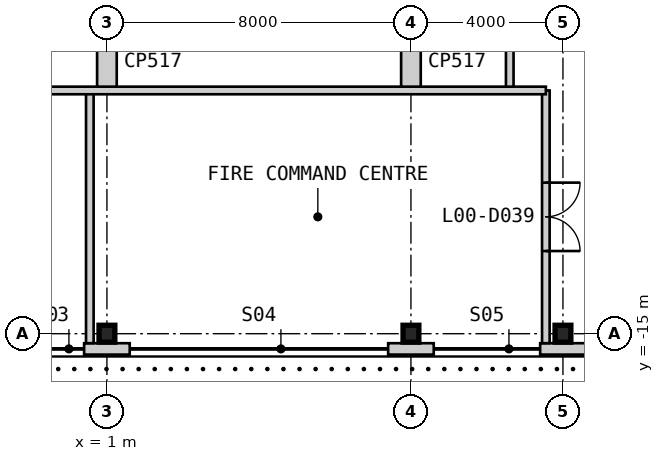
"""IFC4 building model, lengths in metres.
Left out: names, types, materials, properties, quantities, classifications, styles, units other than length and angle.
Written with IfcOpenShell. Run it as: python <this file> out.ifc"""

import sys

from ifc_helpers import new_model, si_unit, direction, frame, frame_2d, origin, origin_2d, place, context, subcontext, project, spatial, rectangle, i_section, extrude, element, fill, save


model = new_model("IFC4")
c1 = context("Model", 3, precision=1e-05, world=origin(), true_north=direction((0.0, 1.0)))
c2 = subcontext(c1, "Body", "Model", "MODEL_VIEW")
j1 = project(units=[si_unit("LENGTHUNIT", "METRE"), si_unit("PLANEANGLEUNIT", "RADIAN")], contexts=[c1])
p1 = place(None, origin())
s1 = spatial("IfcSite", under=j1, at=p1, CompositionType="ELEMENT")
p2 = place(p1, origin())
s2 = spatial("IfcBuilding", under=s1, at=p2, CompositionType="ELEMENT")
p3 = place(p2, origin())
s3 = spatial("IfcBuildingStorey", under=s2, at=p3, CompositionType="ELEMENT", Elevation=0.0)
for number, where, z_axis, x_axis in (
    (1, (1.0, -15.0, -0.3), (0.0, 0.0, 1.0), (1.0, 0.0, 0.0)),
    (2, (9.0, -15.0, -0.3), (0.0, 0.0, 1.0), (1.0, 0.0, 0.0)),
    (3, (13.0, -15.0, -0.3), (0.0, 0.0, 1.0), (1.0, 0.0, 0.0)),
):
    element("IfcColumn", number, at=place(p3, frame(where, z_axis=z_axis, x_axis=x_axis)), inside=s3, PredefinedType="COLUMN", context=c2, shape_type="SweptSolid", body=[
        extrude(i_section(OverallWidth=0.417, OverallDepth=0.445, WebThickness=0.039, FlangeThickness=0.063, at=origin_2d()), origin(), (0.0, 0.0, 1.0), 7.3),
    ])
for number, where, z_axis, x_axis in (
    (4, (0.4, -15.4, 0.0), (0.0, 0.0, 1.0), (1.0, 0.0, 0.0)),
    (5, (8.4, -15.4, 0.0), (0.0, 0.0, 1.0), (1.0, 0.0, 0.0)),
    (6, (12.4, -15.4, 0.0), (0.0, 0.0, 1.0), (1.0, 0.0, 0.0)),
):
    element("IfcWall", number, at=place(p3, frame(where, z_axis=z_axis, x_axis=x_axis)), inside=s3, PredefinedType="SOLIDWALL", context=c2, shape_type="SweptSolid", body=[
        extrude(rectangle(XDim=1.2, YDim=0.3, at=frame_2d((0.6, 0.0))), origin(), (0.0, 0.0, 1.0), 6.7),
    ])
p4 = place(p3, frame((0.55, -15.25, 0.0), z_axis=(0.0, 0.0, 1.0), x_axis=(0.0, 1.0, 0.0)))
e7 = element("IfcWall", 7, at=p4, inside=s3, PredefinedType="PARTITIONING", context=c2, shape_type="SweptSolid", body=[
    extrude(rectangle(XDim=6.65, YDim=0.2, at=frame_2d((3.325, 0.0))), origin(), (0.0, 0.0, 1.0), 6.7),
])
p5 = place(p3, frame((11.6, -8.6, 0.0), z_axis=(0.0, 0.0, 1.0), x_axis=(0.0, 1.0, 0.0)))
e8 = element("IfcWall", 8, at=p5, inside=s3, PredefinedType="PARTITIONING", context=c2, shape_type="SweptSolid", body=[
    extrude(rectangle(XDim=15.6, YDim=0.2, at=frame_2d((7.8, 0.0))), origin(), (0.0, 0.0, 1.0), 6.7),
])
p6 = place(p5, frame((3.125, 0.0, 0.0)))
e9 = element("IfcOpeningElement", 9, at=p6, cuts=e8, PredefinedType="OPENING", context=c2, shape_type="SweptSolid", body=[
    extrude(rectangle(XDim=1.8, YDim=2.4, at=frame_2d((0.9, 1.2))), frame((0.0, 0.11, 0.0), z_axis=(0.0, -1.0, 0.0), x_axis=(1.0, 0.0, 0.0)), (0.0, 0.0, 1.0), 0.22),
])
p7 = place(p5, frame((10.45, 0.0, 0.0)))
e10 = element("IfcOpeningElement", 10, at=p7, cuts=e8, PredefinedType="OPENING", context=c2, shape_type="SweptSolid", body=[
    extrude(rectangle(XDim=0.9, YDim=2.2, at=frame_2d((0.45, 1.1))), frame((0.0, 0.11, 0.0), z_axis=(0.0, -1.0, 0.0), x_axis=(1.0, 0.0, 0.0)), (0.0, 0.0, 1.0), 0.22),
])
p8 = place(p5, frame((13.225, 0.0, 0.0)))
e11 = element("IfcOpeningElement", 11, at=p8, cuts=e8, PredefinedType="OPENING", context=c2, shape_type="SweptSolid", body=[
    extrude(rectangle(XDim=0.9, YDim=2.2, at=frame_2d((0.45, 1.1))), frame((0.0, 0.11, 0.0), z_axis=(0.0, -1.0, 0.0), x_axis=(1.0, 0.0, 0.0)), (0.0, 0.0, 1.0), 0.22),
])
p9 = place(p3, frame((12.55, -15.25, 0.0), z_axis=(0.0, 0.0, 1.0), x_axis=(0.0, 1.0, 0.0)))
e12 = element("IfcWall", 12, at=p9, inside=s3, PredefinedType="PARTITIONING", context=c2, shape_type="SweptSolid", body=[
    extrude(rectangle(XDim=6.65, YDim=0.2, at=frame_2d((3.325, 0.0))), origin(), (0.0, 0.0, 1.0), 6.7),
])
p10 = place(p9, frame((2.425, 0.0, 0.0)))
e13 = element("IfcOpeningElement", 13, at=p10, cuts=e12, PredefinedType="OPENING", context=c2, shape_type="SweptSolid", body=[
    extrude(rectangle(XDim=1.8, YDim=2.4, at=frame_2d((0.9, 1.2))), frame((0.0, 0.11, 0.0), z_axis=(0.0, -1.0, 0.0), x_axis=(1.0, 0.0, 0.0)), (0.0, 0.0, 1.0), 0.22),
])
p11 = place(p3, frame((-0.6, -8.6, 0.0), z_axis=(0.0, 0.0, 1.0), x_axis=(1.0, 0.0, 0.0)))
e14 = element("IfcWall", 14, at=p11, inside=s3, PredefinedType="PARTITIONING", context=c2, shape_type="SweptSolid", body=[
    extrude(rectangle(XDim=13.15, YDim=0.2, at=frame_2d((6.575, 0.0))), origin(), (0.0, 0.0, 1.0), 6.7),
])
for number, where, z_axis, x_axis in (
    (15, (1.0, -8.5, 0.0), (0.0, 0.0, 1.0), (0.0, 1.0, 0.0)),
    (16, (9.0, -8.5, 0.0), (0.0, 0.0, 1.0), (0.0, 1.0, 0.0)),
):
    element("IfcWall", number, at=place(p3, frame(where, z_axis=z_axis, x_axis=x_axis)), inside=s3, PredefinedType="PARTITIONING", context=c2, shape_type="SweptSolid", body=[
        extrude(rectangle(XDim=1.278, YDim=0.517, at=frame_2d((0.639, 0.0))), origin(), (0.0, 0.0, 1.0), 5.954),
    ])
p12 = place(p10, frame((1.8, 0.0, 0.0), z_axis=(0.0, 0.0, 1.0), x_axis=(-1.0, 0.0, 0.0)))
e17 = element("IfcDoor", 17, at=p12, inside=s3, OperationType="DOUBLE_DOOR_SINGLE_SWING", PredefinedType="DOOR", context=c2, shape_type="SweptSolid", body=[
    extrude(rectangle(XDim=1.8, YDim=2.4, at=frame_2d((0.9, 1.2))), frame((0.0, 0.025, 0.0), z_axis=(0.0, -1.0, 0.0), x_axis=(1.0, 0.0, 0.0)), (0.0, 0.0, 1.0), 0.05),
])
fill(e13, e17)
save(model, sys.argv[1])
